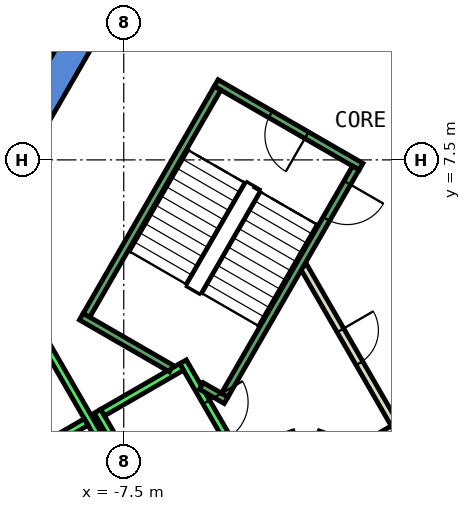
"""IFC4 building model, lengths in metres.
Left out: names, types, materials, properties, quantities, classifications, styles, units other than length and angle.
Written with IfcOpenShell. Run it as: python <this file> out.ifc"""

import sys

from ifc_helpers import new_model, si_unit, direction, frame, frame_2d, origin, place, context, subcontext, project, spatial, polyline, rectangle, outline, extrude, element, fill, save


model = new_model("IFC4")
c1 = context("Model", 3, precision=1e-05, world=origin(), true_north=direction((0.0, 1.0)))
c2 = subcontext(c1, "Body", "Model", "MODEL_VIEW")
j1 = project(units=[si_unit("LENGTHUNIT", "METRE"), si_unit("PLANEANGLEUNIT", "RADIAN")], contexts=[c1])
p1 = place(None, origin())
s1 = spatial("IfcSite", under=j1, at=p1, CompositionType="ELEMENT")
p2 = place(p1, origin())
s2 = spatial("IfcBuilding", under=s1, at=p2, CompositionType="ELEMENT")
p3 = place(p2, frame((0.0, 0.0, 150.8)))
s3 = spatial("IfcBuildingStorey", under=s2, at=p3, CompositionType="ELEMENT", Elevation=150.8)
p4 = place(p3, frame((0.0, 0.0, -0.4)))
e1 = element("IfcWall", 1, at=p4, inside=s3, PredefinedType="SHEAR", context=c2, shape_type="SweptSolid", body=[
    extrude(outline(polyline([(-12.267, 5.252), (-11.575, 4.852), (-6.466, 13.7), (-6.928, 14.5), (-12.267, 5.252)])), origin(), (0.0, 0.0, 1.0), 4.2),
])
p5 = place(p3, frame((0.0, 0.0, -0.4)))
e2 = element("IfcWall", 2, at=p5, inside=s3, PredefinedType="SHEAR", context=c2, shape_type="SweptSolid", body=[
    extrude(outline(polyline([(-13.856, 2.5), (-6.928, -9.5), (-6.466, -8.7), (-12.933, 2.5), (-13.856, 2.5)])), origin(), (0.0, 0.0, 1.0), 4.2),
])
p6 = place(p3, frame((-0.52, -1.0, 0.0), z_axis=(0.0, 0.0, 1.0), x_axis=(0.50011622646, 0.865958290007, 0.0)))
e3 = element("IfcWall", 3, at=p6, inside=s3, PredefinedType="PARTITIONING", context=c2, shape_type="SweptSolid", body=[
    extrude(rectangle(XDim=4.991, YDim=0.2, at=frame_2d((2.496, 0.0))), origin(), (0.0, 0.0, 1.0), 3.8),
])
p7 = place(p6, frame((1.945, 0.0, 0.0)))
e4 = element("IfcOpeningElement", 4, at=p7, cuts=e3, PredefinedType="OPENING", context=c2, shape_type="SweptSolid", body=[
    extrude(rectangle(XDim=1.0, YDim=2.1, at=frame_2d((0.5, 1.05))), frame((0.0, 0.11, 0.0), z_axis=(0.0, -1.0, 0.0), x_axis=(1.0, 0.0, 0.0)), (0.0, 0.0, 1.0), 0.22),
])
p8 = place(p3, frame((-2.771, 4.7, 0.0), z_axis=(0.0, 0.0, 1.0), x_axis=(0.499969479948, -0.866043023828, 0.0)))
e5 = element("IfcWall", 5, at=p8, inside=s3, PredefinedType="PARTITIONING", context=c2, shape_type="SweptSolid", body=[
    extrude(rectangle(XDim=4.99, YDim=0.2, at=frame_2d((2.495, 0.0))), origin(), (0.0, 0.0, 1.0), 3.8),
])
p9 = place(p8, frame((1.945, 0.0, 0.0)))
e6 = element("IfcOpeningElement", 6, at=p9, cuts=e5, PredefinedType="OPENING", context=c2, shape_type="SweptSolid", body=[
    extrude(rectangle(XDim=1.0, YDim=2.1, at=frame_2d((0.5, 1.05))), frame((0.0, 0.11, 0.0), z_axis=(0.0, -1.0, 0.0), x_axis=(1.0, 0.0, 0.0)), (0.0, 0.0, 1.0), 0.22),
])
p10 = place(p3, frame((-0.412, 0.414, 0.0), z_axis=(0.0, 0.0, 1.0), x_axis=(-0.866017369001, -0.500013916395, 0.0)))
e7 = element("IfcWall", 7, at=p10, inside=s3, PredefinedType="PARTITIONING", context=c2, shape_type="SweptSolid", body=[
    extrude(rectangle(XDim=1.45, YDim=0.2, at=frame_2d((0.725, 0.0))), origin(), (0.0, 0.0, 1.0), 3.8),
])
p11 = place(p3, frame((-2.07, 0.16, 0.0), z_axis=(0.0, 0.0, 1.0), x_axis=(-0.942199461132, 0.335052496547, 0.0)))
e8 = element("IfcWall", 8, at=p11, inside=s3, PredefinedType="PARTITIONING", context=c2, shape_type="SweptSolid", body=[
    extrude(rectangle(XDim=0.337, YDim=0.2, at=frame_2d((0.169, 0.0))), origin(), (0.0, 0.0, 1.0), 3.8),
])
p12 = place(p3, frame((-3.012, 0.273, 0.0), z_axis=(0.0, 0.0, 1.0), x_axis=(-0.942280615813, -0.334824194261, 0.0)))
e9 = element("IfcWall", 9, at=p12, inside=s3, PredefinedType="PARTITIONING", context=c2, shape_type="SweptSolid", body=[
    extrude(rectangle(XDim=0.338, YDim=0.2, at=frame_2d((0.169, 0.0))), origin(), (0.0, 0.0, 1.0), 3.8),
])
p13 = place(p3, frame((-5.94, 2.188, 0.0), z_axis=(0.0, 0.0, 1.0), x_axis=(0.49994636267, -0.866056369097, 0.0)))
e10 = element("IfcWall", 10, at=p13, inside=s3, PredefinedType="STANDARD", context=c2, shape_type="SweptSolid", body=[
    extrude(rectangle(XDim=2.8, YDim=0.2, at=frame_2d((1.4, 0.0))), origin(), (0.0, 0.0, 1.0), 3.8),
])
p14 = place(p13, frame((1.225, 0.0, 0.0)))
e11 = element("IfcOpeningElement", 11, at=p14, cuts=e10, PredefinedType="OPENING", context=c2, shape_type="SweptSolid", body=[
    extrude(rectangle(XDim=1.1, YDim=2.1, at=frame_2d((0.55, 1.05))), frame((0.0, 0.11, 0.0), z_axis=(0.0, -1.0, 0.0), x_axis=(1.0, 0.0, 0.0)), (0.0, 0.0, 1.0), 0.22),
])
p15 = place(p3, frame((-8.192, 0.888, 0.0), z_axis=(0.0, 0.0, 1.0), x_axis=(0.49994636267, -0.866056369097, 0.0)))
e12 = element("IfcWall", 12, at=p15, inside=s3, PredefinedType="STANDARD", context=c2, shape_type="SweptSolid", body=[
    extrude(rectangle(XDim=2.8, YDim=0.2, at=frame_2d((1.4, 0.0))), origin(), (0.0, 0.0, 1.0), 3.8),
])
p16 = place(p3, frame((-5.977, 2.052, 0.0), z_axis=(0.0, 0.0, 1.0), x_axis=(-0.865973769406, -0.500089422704, 0.0)))
e13 = element("IfcWall", 13, at=p16, inside=s3, PredefinedType="STANDARD", context=c2, shape_type="SweptSolid", body=[
    extrude(rectangle(XDim=2.399, YDim=0.2, at=frame_2d((1.2, 0.0))), origin(), (0.0, 0.0, 1.0), 3.8),
])
p17 = place(p3, frame((-9.751, 2.99, 0.0), z_axis=(0.0, 0.0, 1.0), x_axis=(0.50000090737, -0.866024879913, 0.0)))
e14 = element("IfcWall", 14, at=p17, inside=s3, PredefinedType="STANDARD", context=c2, shape_type="SweptSolid", body=[
    extrude(rectangle(XDim=10.6, YDim=0.2, at=frame_2d((5.3, 0.0))), origin(), (0.0, 0.0, 1.0), 3.8),
])
p18 = place(p3, frame((-8.488, 0.602, 0.0), z_axis=(0.0, 0.0, 1.0), x_axis=(-0.866022959057, -0.500004234368, 0.0)))
e15 = element("IfcWall", 15, at=p18, inside=s3, PredefinedType="STANDARD", context=c2, shape_type="SweptSolid", body=[
    extrude(rectangle(XDim=2.5, YDim=0.2, at=frame_2d((1.25, 0.0))), origin(), (0.0, 0.0, 1.0), 3.8),
])
p19 = place(p3, frame((-1.256, 7.324, 0.0), z_axis=(0.0, 0.0, 1.0), x_axis=(-0.866046073146, 0.499964197906, 0.0)))
e16 = element("IfcWall", 16, at=p19, inside=s3, PredefinedType="STANDARD", context=c2, shape_type="SweptSolid", body=[
    extrude(rectangle(XDim=4.4, YDim=0.2, at=frame_2d((2.2, 0.0))), origin(), (0.0, 0.0, 1.0), 3.8),
])
p20 = place(p19, frame((1.65, 0.0, 0.0)))
e17 = element("IfcOpeningElement", 17, at=p20, cuts=e16, PredefinedType="OPENING", context=c2, shape_type="SweptSolid", body=[
    extrude(rectangle(XDim=1.1, YDim=2.2, at=frame_2d((0.55, 1.1))), frame((0.0, 0.11, 0.0), z_axis=(0.0, -1.0, 0.0), x_axis=(1.0, 0.0, 0.0)), (0.0, 0.0, 1.0), 0.22),
])
p21 = place(p3, frame((-6.25, 2.01, 0.0), z_axis=(0.0, 0.0, 1.0), x_axis=(-0.86611865017, 0.499838457731, 0.0)))
e18 = element("IfcWall", 18, at=p21, inside=s3, PredefinedType="STANDARD", context=c2, shape_type="SweptSolid", body=[
    extrude(rectangle(XDim=2.733, YDim=0.2, at=frame_2d((1.366, 0.0))), origin(), (0.0, 0.0, 1.0), 3.8),
])
p22 = place(p3, frame((-4.806, 1.176, 0.0), z_axis=(0.0, 0.0, 1.0), x_axis=(-0.866558586415, 0.499075361355, 0.0)))
e19 = element("IfcWall", 19, at=p22, inside=s3, PredefinedType="STANDARD", context=c2, shape_type="SweptSolid", body=[
    extrude(rectangle(XDim=0.751, YDim=0.2, at=frame_2d((0.376, 0.0))), origin(), (0.0, 0.0, 1.0), 3.8),
])
p23 = place(p3, frame((-1.393, 7.288, 0.0), z_axis=(0.0, 0.0, 1.0), x_axis=(-0.499963383562, -0.866046543262, 0.0)))
e20 = element("IfcWall", 20, at=p23, inside=s3, PredefinedType="STANDARD", context=c2, shape_type="SweptSolid", body=[
    extrude(rectangle(XDim=6.9, YDim=0.2, at=frame_2d((3.45, 0.0))), origin(), (0.0, 0.0, 1.0), 3.8),
])
p24 = place(p23, frame((0.45, 0.0, 0.0)))
e21 = element("IfcOpeningElement", 21, at=p24, cuts=e20, PredefinedType="OPENING", context=c2, shape_type="SweptSolid", body=[
    extrude(rectangle(XDim=1.1, YDim=2.2, at=frame_2d((0.55, 1.1))), frame((0.0, 0.11, 0.0), z_axis=(0.0, -1.0, 0.0), x_axis=(1.0, 0.0, 0.0)), (0.0, 0.0, 1.0), 0.22),
])
p25 = place(p3, frame((-5.03, 9.388, 0.0), z_axis=(0.0, 0.0, 1.0), x_axis=(-0.499978703459, -0.866037698999, 0.0)))
e22 = element("IfcWall", 22, at=p25, inside=s3, PredefinedType="STANDARD", context=c2, shape_type="SweptSolid", body=[
    extrude(rectangle(XDim=6.9, YDim=0.2, at=frame_2d((3.45, 0.0))), origin(), (0.0, 0.0, 1.0), 3.8),
])
p26 = place(p9, origin())
e23 = element("IfcDoor", 23, at=p26, inside=s3, OperationType="SINGLE_SWING_RIGHT", PredefinedType="DOOR", context=c2, shape_type="SweptSolid", body=[
    extrude(rectangle(XDim=1.0, YDim=2.1, at=frame_2d((0.5, 1.05))), frame((0.0, 0.025, 0.0), z_axis=(0.0, -1.0, 0.0), x_axis=(1.0, 0.0, 0.0)), (0.0, 0.0, 1.0), 0.05),
])
fill(e6, e23)
p27 = place(p14, origin())
e24 = element("IfcDoor", 24, at=p27, inside=s3, OperationType="SLIDING_TO_LEFT", PredefinedType="DOOR", context=c2, shape_type="SweptSolid", body=[
    extrude(rectangle(XDim=1.1, YDim=2.1, at=frame_2d((0.55, 1.05))), frame((0.0, 0.025, 0.0), z_axis=(0.0, -1.0, 0.0), x_axis=(1.0, 0.0, 0.0)), (0.0, 0.0, 1.0), 0.05),
])
fill(e11, e24)
p28 = place(p24, origin())
e25 = element("IfcDoor", 25, at=p28, inside=s3, OperationType="SINGLE_SWING_LEFT", PredefinedType="DOOR", context=c2, shape_type="SweptSolid", body=[
    extrude(rectangle(XDim=1.1, YDim=2.2, at=frame_2d((0.55, 1.1))), frame((0.0, 0.025, 0.0), z_axis=(0.0, -1.0, 0.0), x_axis=(1.0, 0.0, 0.0)), (0.0, 0.0, 1.0), 0.05),
])
fill(e21, e25)
p29 = place(p20, origin())
e26 = element("IfcDoor", 26, at=p29, inside=s3, OperationType="SINGLE_SWING_LEFT", PredefinedType="DOOR", context=c2, shape_type="SweptSolid", body=[
    extrude(rectangle(XDim=1.1, YDim=2.2, at=frame_2d((0.55, 1.1))), frame((0.0, 0.025, 0.0), z_axis=(0.0, -1.0, 0.0), x_axis=(1.0, 0.0, 0.0)), (0.0, 0.0, 1.0), 0.05),
])
fill(e17, e26)
save(model, sys.argv[1])
